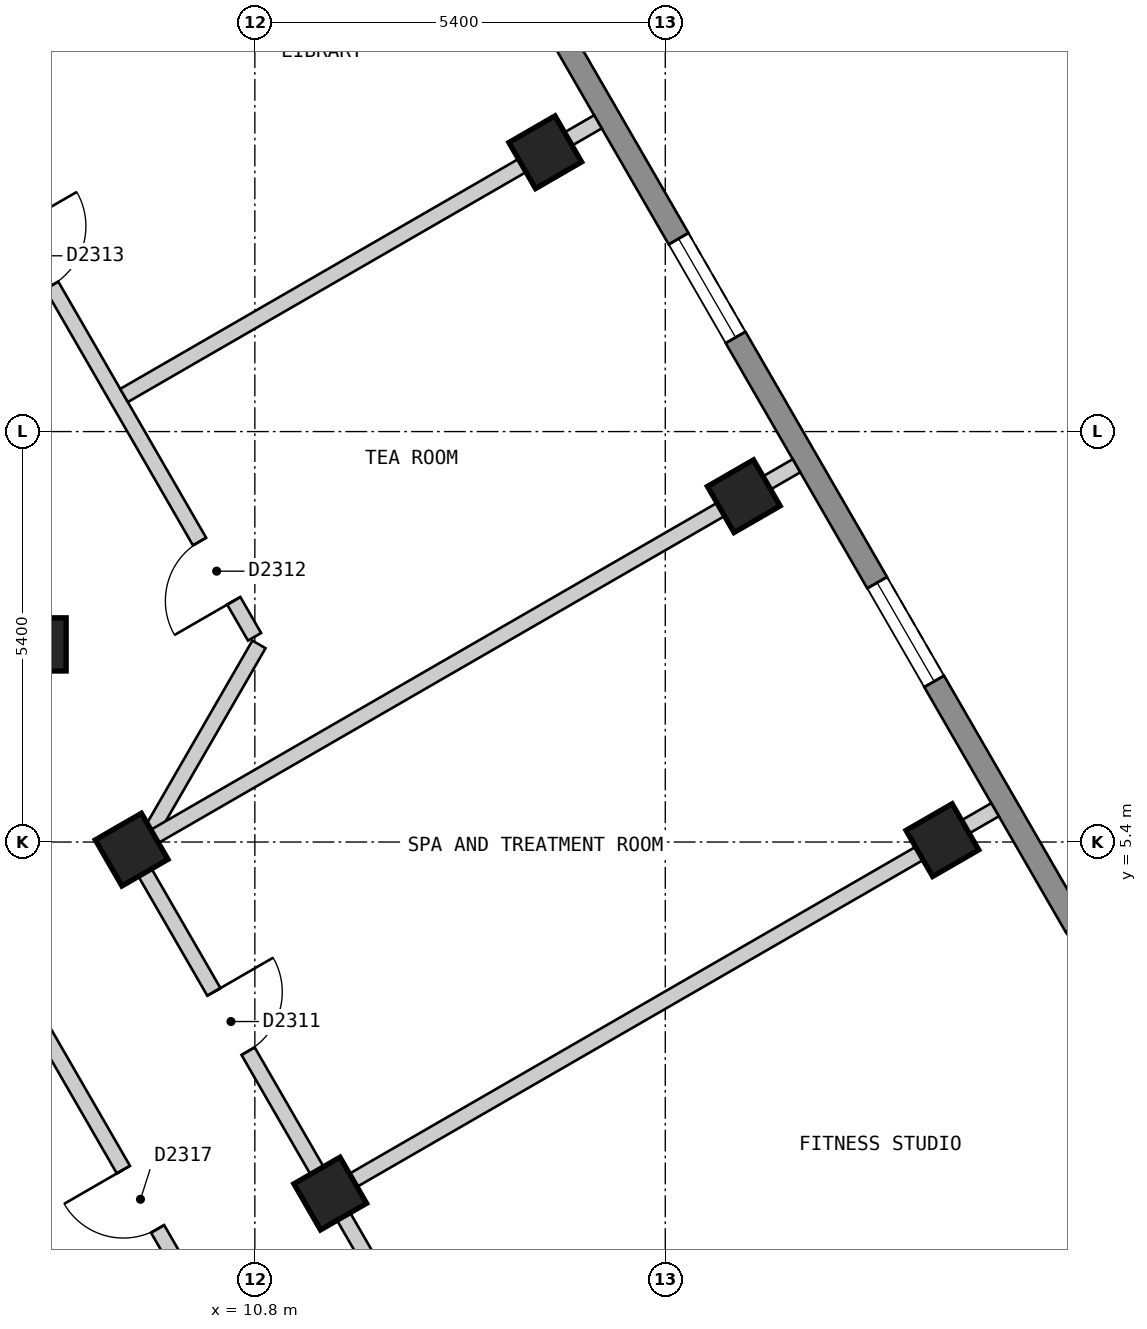
"""IFC4 building model, lengths in metres.
Left out: names, types, materials, properties, quantities, classifications, styles, units other than length and angle.
Written with IfcOpenShell. Run it as: python <this file> out.ifc"""

import sys

from ifc_helpers import new_model, si_unit, direction, frame, frame_2d, origin, origin_2d, place, context, subcontext, project, spatial, polyline, rectangle, outline, extrude, element, fill, save


model = new_model("IFC4")
c1 = context("Model", 3, precision=1e-05, world=origin(), true_north=direction((0.0, 1.0)))
c2 = subcontext(c1, "Body", "Model", "MODEL_VIEW")
j1 = project(units=[si_unit("LENGTHUNIT", "METRE"), si_unit("PLANEANGLEUNIT", "RADIAN")], contexts=[c1])
p1 = place(None, origin())
s1 = spatial("IfcSite", under=j1, at=p1, CompositionType="ELEMENT")
p2 = place(p1, origin())
s2 = spatial("IfcBuilding", under=s1, at=p2, CompositionType="ELEMENT")
p3 = place(p2, frame((0.0, 0.0, 241.8)))
s3 = spatial("IfcBuildingStorey", under=s2, at=p3, CompositionType="ELEMENT", Elevation=241.8)
for number, where, z_axis, x_axis in (
    (1, (19.846, 5.425, 0.0), (0.0, 0.0, 1.0), (-0.5, 0.866, 0.0)),
    (2, (17.233, 9.95, 0.0), (0.0, 0.0, 1.0), (-0.5, 0.866, 0.0)),
    (3, (14.621, 14.475, 0.0), (0.0, 0.0, 1.0), (-0.5, 0.866, 0.0)),
    (4, (11.792, 0.775, 0.0), (0.0, 0.0, 1.0), (-0.5, 0.866, 0.0)),
    (5, (9.179, 5.3, 0.0), (0.0, 0.0, 1.0), (-0.5, 0.866, 0.0)),
    (6, (7.967, 8.0, 0.0), (0.0, 0.0, 1.0), (1.0, 0.0, 0.0)),
):
    element("IfcColumn", number, at=place(p3, frame(where, z_axis=z_axis, x_axis=x_axis)), inside=s3, PredefinedType="COLUMN", context=c2, shape_type="SweptSolid", body=[
        extrude(rectangle(XDim=0.7, YDim=0.7, at=origin_2d()), origin(), (0.0, 0.0, 1.0), 3.0),
    ])
p4 = place(p3, frame((23.599, 0.825, 0.0), z_axis=(0.0, 0.0, 1.0), x_axis=(-0.500003656944, 0.866023292436, 0.0)))
e7 = element("IfcWall", 7, at=p4, inside=s3, PredefinedType="SOLIDWALL", context=c2, shape_type="SweptSolid", body=[
    extrude(outline(polyline([(0.0, -0.15), (22.17, -0.15), (22.09, 0.15), (0.08, 0.15), (0.0, -0.15)])), origin(), (0.0, 0.0, 1.0), 2.2),
])
p5 = place(p4, frame((2.497, 0.0, 0.15)))
e8 = element("IfcOpeningElement", 8, at=p5, cuts=e7, PredefinedType="OPENING", context=c2, shape_type="SweptSolid", body=[
    extrude(rectangle(XDim=1.5, YDim=2.1, at=frame_2d((0.75, 1.05))), frame((0.0, 0.16, 0.0), z_axis=(0.0, -1.0, 0.0), x_axis=(1.0, 0.0, 0.0)), (0.0, 0.0, 1.0), 0.32),
])
p6 = place(p4, frame((7.723, 0.0, 0.15)))
e9 = element("IfcOpeningElement", 9, at=p6, cuts=e7, PredefinedType="OPENING", context=c2, shape_type="SweptSolid", body=[
    extrude(rectangle(XDim=1.5, YDim=2.1, at=frame_2d((0.75, 1.05))), frame((0.0, 0.16, 0.0), z_axis=(0.0, -1.0, 0.0), x_axis=(1.0, 0.0, 0.0)), (0.0, 0.0, 1.0), 0.32),
])
p7 = place(p4, frame((12.948, 0.0, 0.15)))
e10 = element("IfcOpeningElement", 10, at=p7, cuts=e7, PredefinedType="OPENING", context=c2, shape_type="SweptSolid", body=[
    extrude(rectangle(XDim=1.5, YDim=2.1, at=frame_2d((0.75, 1.05))), frame((0.0, 0.16, 0.0), z_axis=(0.0, -1.0, 0.0), x_axis=(1.0, 0.0, 0.0)), (0.0, 0.0, 1.0), 0.32),
])
p8 = place(p4, frame((18.173, 0.0, 0.15)))
e11 = element("IfcOpeningElement", 11, at=p8, cuts=e7, PredefinedType="OPENING", context=c2, shape_type="SweptSolid", body=[
    extrude(rectangle(XDim=1.5, YDim=2.1, at=frame_2d((0.75, 1.05))), frame((0.0, 0.16, 0.0), z_axis=(0.0, -1.0, 0.0), x_axis=(1.0, 0.0, 0.0)), (0.0, 0.0, 1.0), 0.32),
])
p9 = place(p3, frame((8.026, 2.899, 0.0), z_axis=(0.0, 0.0, 1.0), x_axis=(0.499986018985, -0.866033475577, 0.0)))
e12 = element("IfcWall", 12, at=p9, inside=s3, PredefinedType="PARTITIONING", context=c2, shape_type="SweptSolid", body=[
    extrude(rectangle(XDim=5.078, YDim=0.2, at=frame_2d((2.539, 0.0))), origin(), (0.0, 0.0, 1.0), 2.2),
])
p10 = place(p9, frame((2.089, 0.0, 0.0)))
e13 = element("IfcOpeningElement", 13, at=p10, cuts=e12, PredefinedType="OPENING", context=c2, shape_type="SweptSolid", body=[
    extrude(rectangle(XDim=0.9, YDim=2.1, at=frame_2d((0.45, 1.05))), frame((0.0, 0.11, 0.0), z_axis=(0.0, -1.0, 0.0), x_axis=(1.0, 0.0, 0.0)), (0.0, 0.0, 1.0), 0.22),
])
p11 = place(p3, frame((9.238, 5.2, 0.0), z_axis=(0.0, 0.0, 1.0), x_axis=(0.500025705601, -0.86601056214, 0.0)))
e14 = element("IfcWall", 14, at=p11, inside=s3, PredefinedType="PARTITIONING", context=c2, shape_type="SweptSolid", body=[
    extrude(rectangle(XDim=7.735, YDim=0.2, at=frame_2d((3.868, 0.0))), origin(), (0.0, 0.0, 1.0), 2.2),
])
p12 = place(p11, frame((6.045, 0.0, 0.0)))
e15 = element("IfcOpeningElement", 15, at=p12, cuts=e14, PredefinedType="OPENING", context=c2, shape_type="SweptSolid", body=[
    extrude(rectangle(XDim=0.9, YDim=2.1, at=frame_2d((0.45, 1.05))), frame((0.0, 0.11, 0.0), z_axis=(0.0, -1.0, 0.0), x_axis=(1.0, 0.0, 0.0)), (0.0, 0.0, 1.0), 0.22),
])
p13 = place(p11, frame((2.046, 0.0, 0.0)))
e16 = element("IfcOpeningElement", 16, at=p13, cuts=e14, PredefinedType="OPENING", context=c2, shape_type="SweptSolid", body=[
    extrude(rectangle(XDim=0.9, YDim=2.1, at=frame_2d((0.45, 1.05))), frame((0.0, 0.11, 0.0), z_axis=(0.0, -1.0, 0.0), x_axis=(1.0, 0.0, 0.0)), (0.0, 0.0, 1.0), 0.22),
])
p14 = place(p3, frame((5.485, 17.3, 0.0), z_axis=(0.0, 0.0, 1.0), x_axis=(0.499943285704, -0.866058145322, 0.0)))
e17 = element("IfcWall", 17, at=p14, inside=s3, PredefinedType="PARTITIONING", context=c2, shape_type="SweptSolid", body=[
    extrude(rectangle(XDim=10.623, YDim=0.2, at=frame_2d((5.312, 0.0))), origin(), (0.0, 0.0, 1.0), 2.2),
])
p15 = place(p14, frame((9.176, 0.0, 0.0)))
e18 = element("IfcOpeningElement", 18, at=p15, cuts=e17, PredefinedType="OPENING", context=c2, shape_type="SweptSolid", body=[
    extrude(rectangle(XDim=0.9, YDim=2.1, at=frame_2d((0.45, 1.05))), frame((0.0, 0.11, 0.0), z_axis=(0.0, -1.0, 0.0), x_axis=(1.0, 0.0, 0.0)), (0.0, 0.0, 1.0), 0.22),
])
p16 = place(p14, frame((4.385, 0.0, 0.0)))
e19 = element("IfcOpeningElement", 19, at=p16, cuts=e17, PredefinedType="OPENING", context=c2, shape_type="SweptSolid", body=[
    extrude(rectangle(XDim=0.9, YDim=2.1, at=frame_2d((0.45, 1.05))), frame((0.0, 0.11, 0.0), z_axis=(0.0, -1.0, 0.0), x_axis=(1.0, 0.0, 0.0)), (0.0, 0.0, 1.0), 0.22),
])
p17 = place(p3, frame((9.454, 5.574, 0.0), z_axis=(0.0, 0.0, 1.0), x_axis=(0.499795394297, 0.86614350072, 0.0)))
e20 = element("IfcWall", 20, at=p17, inside=s3, PredefinedType="PARTITIONING", context=c2, shape_type="SweptSolid", body=[
    extrude(rectangle(XDim=2.801, YDim=0.2, at=frame_2d((1.4, 0.0))), origin(), (0.0, 0.0, 1.0), 2.2),
])
p18 = place(p3, frame((11.879, 0.826, 0.0), z_axis=(0.0, 0.0, 1.0), x_axis=(0.866065245018, 0.499930986609, 0.0)))
e21 = element("IfcWall", 21, at=p18, inside=s3, PredefinedType="PARTITIONING", context=c2, shape_type="SweptSolid", body=[
    extrude(rectangle(XDim=10.0, YDim=0.2, at=frame_2d((5.0, 0.0))), origin(), (0.0, 0.0, 1.0), 2.2),
])
p19 = place(p3, frame((9.354, 5.401, 0.0), z_axis=(0.0, 0.0, 1.0), x_axis=(0.866018411306, 0.500012111133, 0.0)))
e22 = element("IfcWall", 22, at=p19, inside=s3, PredefinedType="PARTITIONING", context=c2, shape_type="SweptSolid", body=[
    extrude(rectangle(XDim=9.898, YDim=0.2, at=frame_2d((4.949, 0.0))), origin(), (0.0, 0.0, 1.0), 2.2),
])
p20 = place(p3, frame((9.079, 11.275, 0.0), z_axis=(0.0, 0.0, 1.0), x_axis=(0.866001485781, 0.500041424909, 0.0)))
e23 = element("IfcWall", 23, at=p20, inside=s3, PredefinedType="PARTITIONING", context=c2, shape_type="SweptSolid", body=[
    extrude(rectangle(XDim=7.2, YDim=0.2, at=frame_2d((3.6, 0.0))), origin(), (0.0, 0.0, 1.0), 2.2),
])
p21 = place(p6, origin())
e24 = element("IfcWindow", 24, at=p21, inside=s3, PartitioningType="SINGLE_PANEL", PredefinedType="WINDOW", context=c2, shape_type="SweptSolid", body=[
    extrude(rectangle(XDim=1.5, YDim=2.1, at=frame_2d((0.75, 1.05))), frame((0.0, 0.03, 0.0), z_axis=(0.0, -1.0, 0.0), x_axis=(1.0, 0.0, 0.0)), (0.0, 0.0, 1.0), 0.06),
])
fill(e9, e24)
p22 = place(p7, origin())
e25 = element("IfcWindow", 25, at=p22, inside=s3, PartitioningType="SINGLE_PANEL", PredefinedType="WINDOW", context=c2, shape_type="SweptSolid", body=[
    extrude(rectangle(XDim=1.5, YDim=2.1, at=frame_2d((0.75, 1.05))), frame((0.0, 0.03, 0.0), z_axis=(0.0, -1.0, 0.0), x_axis=(1.0, 0.0, 0.0)), (0.0, 0.0, 1.0), 0.06),
])
fill(e10, e25)
p23 = place(p13, origin())
e26 = element("IfcDoor", 26, at=p23, inside=s3, OperationType="SINGLE_SWING_LEFT", PredefinedType="DOOR", context=c2, shape_type="SweptSolid", body=[
    extrude(rectangle(XDim=0.9, YDim=2.1, at=frame_2d((0.45, 1.05))), frame((0.0, 0.025, 0.0), z_axis=(0.0, -1.0, 0.0), x_axis=(1.0, 0.0, 0.0)), (0.0, 0.0, 1.0), 0.05),
])
fill(e16, e26)
p24 = place(p15, origin())
e27 = element("IfcDoor", 27, at=p24, inside=s3, OperationType="SINGLE_SWING_RIGHT", PredefinedType="DOOR", context=c2, shape_type="SweptSolid", body=[
    extrude(rectangle(XDim=0.9, YDim=2.1, at=frame_2d((0.45, 1.05))), frame((0.0, 0.025, 0.0), z_axis=(0.0, -1.0, 0.0), x_axis=(1.0, 0.0, 0.0)), (0.0, 0.0, 1.0), 0.05),
])
fill(e18, e27)
p25 = place(p16, origin())
e28 = element("IfcDoor", 28, at=p25, inside=s3, OperationType="SINGLE_SWING_LEFT", PredefinedType="DOOR", context=c2, shape_type="SweptSolid", body=[
    extrude(rectangle(XDim=0.9, YDim=2.1, at=frame_2d((0.45, 1.05))), frame((0.0, 0.025, 0.0), z_axis=(0.0, -1.0, 0.0), x_axis=(1.0, 0.0, 0.0)), (0.0, 0.0, 1.0), 0.05),
])
fill(e19, e28)
p26 = place(p10, origin())
e29 = element("IfcDoor", 29, at=p26, inside=s3, OperationType="SINGLE_SWING_LEFT", PredefinedType="DOOR", context=c2, shape_type="SweptSolid", body=[
    extrude(rectangle(XDim=0.9, YDim=2.1, at=frame_2d((0.45, 1.05))), frame((0.0, 0.025, 0.0), z_axis=(0.0, -1.0, 0.0), x_axis=(1.0, 0.0, 0.0)), (0.0, 0.0, 1.0), 0.05),
])
fill(e13, e29)
save(model, sys.argv[1])
